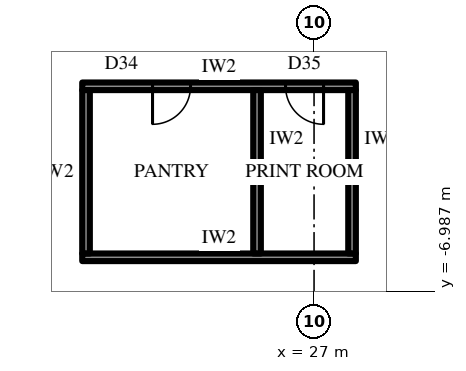
"""IFC4 building model, lengths in metres.
Left out: names, types, materials, properties, quantities, classifications, styles, units other than length and angle.
Written with IfcOpenShell. Run it as: python <this file> out.ifc"""

import sys

from ifc_helpers import new_model, si_unit, direction, frame, frame_2d, origin, place, context, subcontext, project, spatial, rectangle, extrude, element, fill, save


model = new_model("IFC4")
c1 = context("Model", 3, precision=1e-05, world=origin(), true_north=direction((0.0, 1.0)))
c2 = subcontext(c1, "Body", "Model", "MODEL_VIEW")
j1 = project(units=[si_unit("LENGTHUNIT", "METRE"), si_unit("PLANEANGLEUNIT", "RADIAN")], contexts=[c1])
p1 = place(None, origin())
s1 = spatial("IfcSite", under=j1, at=p1, CompositionType="ELEMENT")
p2 = place(p1, origin())
s2 = spatial("IfcBuilding", under=s1, at=p2, CompositionType="ELEMENT")
p3 = place(p2, frame((0.0, 0.0, 136.3)))
s3 = spatial("IfcBuildingStorey", under=s2, at=p3, CompositionType="ELEMENT", Elevation=136.3)
p4 = place(p3, frame((19.644, -28.675, 0.0), z_axis=(0.0, 0.0, 1.0), x_axis=(0.500003084452, 0.866023622968, 0.0)))
e1 = element("IfcWall", 1, at=p4, inside=s3, PredefinedType="SOLIDWALL", context=c2, shape_type="SweptSolid", body=[
    extrude(rectangle(XDim=30.022, YDim=0.3, at=frame_2d((15.011, 0.0))), origin(), (0.0, 0.0, 1.0), 2.75),
])
p5 = place(p4, frame((1.052, 0.0, 0.6)))
e2 = element("IfcOpeningElement", 2, at=p5, cuts=e1, PredefinedType="OPENING", context=c2, shape_type="SweptSolid", body=[
    extrude(rectangle(XDim=2.9, YDim=1.9, at=frame_2d((1.45, 0.95))), frame((0.0, 0.16, 0.0), z_axis=(0.0, -1.0, 0.0), x_axis=(1.0, 0.0, 0.0)), (0.0, 0.0, 1.0), 0.32),
])
p6 = place(p4, frame((6.056, 0.0, 0.6)))
e3 = element("IfcOpeningElement", 3, at=p6, cuts=e1, PredefinedType="OPENING", context=c2, shape_type="SweptSolid", body=[
    extrude(rectangle(XDim=2.9, YDim=1.9, at=frame_2d((1.45, 0.95))), frame((0.0, 0.16, 0.0), z_axis=(0.0, -1.0, 0.0), x_axis=(1.0, 0.0, 0.0)), (0.0, 0.0, 1.0), 0.32),
])
p7 = place(p4, frame((11.909, 0.0, 0.0)))
e4 = element("IfcOpeningElement", 4, at=p7, cuts=e1, PredefinedType="OPENING", context=c2, shape_type="SweptSolid", body=[
    extrude(rectangle(XDim=1.2, YDim=2.4, at=frame_2d((0.6, 1.2))), frame((0.0, 0.16, 0.0), z_axis=(0.0, -1.0, 0.0), x_axis=(1.0, 0.0, 0.0)), (0.0, 0.0, 1.0), 0.32),
])
p8 = place(p4, frame((16.063, 0.0, 0.6)))
e5 = element("IfcOpeningElement", 5, at=p8, cuts=e1, PredefinedType="OPENING", context=c2, shape_type="SweptSolid", body=[
    extrude(rectangle(XDim=2.9, YDim=1.9, at=frame_2d((1.45, 0.95))), frame((0.0, 0.16, 0.0), z_axis=(0.0, -1.0, 0.0), x_axis=(1.0, 0.0, 0.0)), (0.0, 0.0, 1.0), 0.32),
])
p9 = place(p4, frame((21.067, 0.0, 0.6)))
e6 = element("IfcOpeningElement", 6, at=p9, cuts=e1, PredefinedType="OPENING", context=c2, shape_type="SweptSolid", body=[
    extrude(rectangle(XDim=2.9, YDim=1.9, at=frame_2d((1.45, 0.95))), frame((0.0, 0.16, 0.0), z_axis=(0.0, -1.0, 0.0), x_axis=(1.0, 0.0, 0.0)), (0.0, 0.0, 1.0), 0.32),
])
p10 = place(p4, frame((26.07, 0.0, 0.6)))
e7 = element("IfcOpeningElement", 7, at=p10, cuts=e1, PredefinedType="OPENING", context=c2, shape_type="SweptSolid", body=[
    extrude(rectangle(XDim=2.9, YDim=1.9, at=frame_2d((1.45, 0.95))), frame((0.0, 0.16, 0.0), z_axis=(0.0, -1.0, 0.0), x_axis=(1.0, 0.0, 0.0)), (0.0, 0.0, 1.0), 0.32),
])
p11 = place(p3, frame((20.9, -1.6, 0.0), z_axis=(0.0, 0.0, 1.0), x_axis=(1.0, 0.0, 0.0)))
e8 = element("IfcWall", 8, at=p11, inside=s3, PredefinedType="PARTITIONING", context=c2, shape_type="SweptSolid", body=[
    extrude(rectangle(XDim=7.2, YDim=0.2, at=frame_2d((3.6, 0.0))), origin(), (0.0, 0.0, 1.0), 4.0),
])
p12 = place(p11, frame((1.85, 0.0, 0.0)))
e9 = element("IfcOpeningElement", 9, at=p12, cuts=e8, PredefinedType="OPENING", context=c2, shape_type="SweptSolid", body=[
    extrude(rectangle(XDim=1.0, YDim=2.2, at=frame_2d((0.5, 1.1))), frame((0.0, 0.11, 0.0), z_axis=(0.0, -1.0, 0.0), x_axis=(1.0, 0.0, 0.0)), (0.0, 0.0, 1.0), 0.22),
])
p13 = place(p11, frame((5.35, 0.0, 0.0)))
e10 = element("IfcOpeningElement", 10, at=p13, cuts=e8, PredefinedType="OPENING", context=c2, shape_type="SweptSolid", body=[
    extrude(rectangle(XDim=1.0, YDim=2.2, at=frame_2d((0.5, 1.1))), frame((0.0, 0.11, 0.0), z_axis=(0.0, -1.0, 0.0), x_axis=(1.0, 0.0, 0.0)), (0.0, 0.0, 1.0), 0.22),
])
p14 = place(p3, frame((20.9, -6.1, 0.0), z_axis=(0.0, 0.0, 1.0), x_axis=(1.0, 0.0, 0.0)))
e11 = element("IfcWall", 11, at=p14, inside=s3, PredefinedType="PARTITIONING", context=c2, shape_type="SweptSolid", body=[
    extrude(rectangle(XDim=7.2, YDim=0.2, at=frame_2d((3.6, 0.0))), origin(), (0.0, 0.0, 1.0), 4.0),
])
for number, where, z_axis, x_axis in (
    (12, (21.0, -1.7, 0.0), (0.0, 0.0, 1.0), (0.0, -1.0, 0.0)),
    (13, (25.5, -1.7, 0.0), (0.0, 0.0, 1.0), (0.0, -1.0, 0.0)),
    (14, (28.0, -1.7, 0.0), (0.0, 0.0, 1.0), (0.0, -1.0, 0.0)),
):
    element("IfcWall", number, at=place(p3, frame(where, z_axis=z_axis, x_axis=x_axis)), inside=s3, PredefinedType="PARTITIONING", context=c2, shape_type="SweptSolid", body=[
        extrude(rectangle(XDim=4.3, YDim=0.2, at=frame_2d((2.15, 0.0))), origin(), (0.0, 0.0, 1.0), 4.0),
    ])
p15 = place(p12, frame((1.0, 0.0, 0.0), z_axis=(0.0, 0.0, 1.0), x_axis=(-1.0, 0.0, 0.0)))
e15 = element("IfcDoor", 15, at=p15, inside=s3, OperationType="SINGLE_SWING_LEFT", PredefinedType="DOOR", context=c2, shape_type="SweptSolid", body=[
    extrude(rectangle(XDim=1.0, YDim=2.2, at=frame_2d((0.5, 1.1))), frame((0.0, 0.025, 0.0), z_axis=(0.0, -1.0, 0.0), x_axis=(1.0, 0.0, 0.0)), (0.0, 0.0, 1.0), 0.05),
])
fill(e9, e15)
p16 = place(p13, frame((1.0, 0.0, 0.0), z_axis=(0.0, 0.0, 1.0), x_axis=(-1.0, 0.0, 0.0)))
e16 = element("IfcDoor", 16, at=p16, inside=s3, OperationType="SINGLE_SWING_RIGHT", PredefinedType="DOOR", context=c2, shape_type="SweptSolid", body=[
    extrude(rectangle(XDim=1.0, YDim=2.2, at=frame_2d((0.5, 1.1))), frame((0.0, 0.025, 0.0), z_axis=(0.0, -1.0, 0.0), x_axis=(1.0, 0.0, 0.0)), (0.0, 0.0, 1.0), 0.05),
])
fill(e10, e16)
save(model, sys.argv[1])
